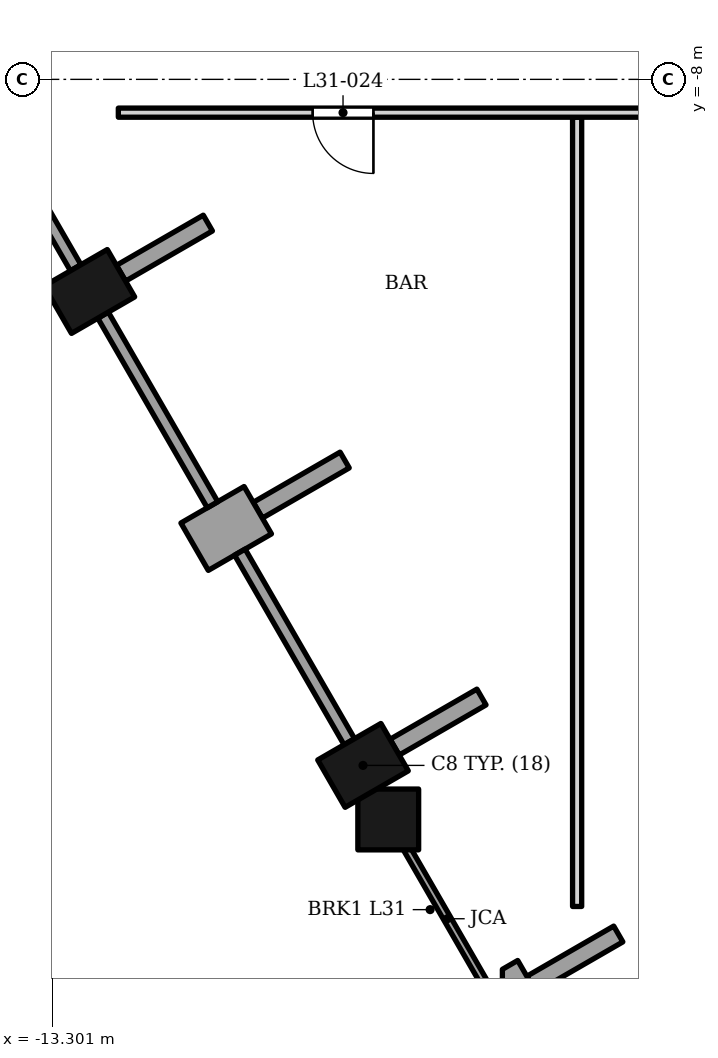
"""IFC4 building model, lengths in metres.
Left out: names, types, materials, properties, quantities, classifications, styles, units other than length and angle.
Written with IfcOpenShell. Run it as: python <this file> out.ifc"""

import sys

from ifc_helpers import new_model, si_unit, direction, frame, frame_2d, origin, origin_2d, place, context, subcontext, project, spatial, polyline, rectangle, outline, extrude, clip, halfspace, element, fill, save


model = new_model("IFC4")
c1 = context("Model", 3, precision=1e-05, world=origin(), true_north=direction((0.0, 1.0)))
c2 = subcontext(c1, "Body", "Model", "MODEL_VIEW")
j1 = project(units=[si_unit("LENGTHUNIT", "METRE"), si_unit("PLANEANGLEUNIT", "RADIAN")], contexts=[c1])
p1 = place(None, origin())
s1 = spatial("IfcSite", under=j1, at=p1, CompositionType="ELEMENT")
p2 = place(p1, origin())
s2 = spatial("IfcBuilding", under=s1, at=p2, CompositionType="ELEMENT")
p3 = place(p2, frame((0.0, 0.0, 132.6)))
s3 = spatial("IfcBuildingStorey", under=s2, at=p3, CompositionType="ELEMENT", Elevation=132.6)
for number, where, z_axis, x_axis in (
    (1, (-12.688, -11.488, 0.0), (0.0, 0.0, 1.0), (0.5, -0.866, 0.0)),
    (2, (-8.188, -19.282, 0.0), (0.0, 0.0, 1.0), (0.5, -0.866, 0.0)),
):
    element("IfcColumn", number, at=place(p3, frame(where, z_axis=z_axis, x_axis=x_axis)), inside=s3, PredefinedType="COLUMN", context=c2, shape_type="SweptSolid", body=[
        extrude(rectangle(XDim=0.9, YDim=1.2, at=origin_2d()), origin(), (0.0, 0.0, 1.0), 7.0),
    ])
p4 = place(p3, frame((-7.773, -20.171, 0.32), z_axis=(0.185133407867, -0.398791803578, 0.898159628735), x_axis=(-0.378191681892, 0.81465438711, 0.439669513737)))
e3 = element("IfcColumn", 3, at=p4, inside=s3, PredefinedType="COLUMN", context=c2, shape_type="Clipping", body=[
    clip(extrude(rectangle(XDim=1.0, YDim=1.0, at=origin_2d()), origin(), (0.0, 0.0, 1.0), 7.438), halfspace(frame((0.0, 0.0, 7.189), z_axis=(0.0, 0.0, 1.0), x_axis=(1.0, 0.0, 0.0)), False)),
])
p5 = place(p3, frame((-12.168, -11.188, 0.0), z_axis=(0.0, 0.0, 1.0), x_axis=(0.865966208357, 0.500102515474, 0.0)))
e4 = element("IfcWall", 4, at=p5, inside=s3, PredefinedType="SOLIDWALL", context=c2, shape_type="SweptSolid", body=[
    extrude(rectangle(XDim=1.65, YDim=0.3, at=frame_2d((0.825, 0.0))), origin(), (0.0, 0.0, 1.0), 6.0),
])
p6 = place(p3, frame((-10.958, -15.685, 0.0), z_axis=(0.0, 0.0, 1.0), x_axis=(0.866043267704, 0.499969057507, 0.0)))
e5 = element("IfcWall", 5, at=p6, inside=s3, PredefinedType="SOLIDWALL", context=c2, shape_type="SweptSolid", body=[
    extrude(rectangle(XDim=1.2, YDim=0.9, at=frame_2d((0.6, 0.0))), origin(), (0.0, 0.0, 1.0), 6.0),
])
p7 = place(p3, frame((-9.919, -15.085, 0.0), z_axis=(0.0, 0.0, 1.0), x_axis=(0.866040211805, 0.499974350878, 0.0)))
e6 = element("IfcWall", 6, at=p7, inside=s3, PredefinedType="SOLIDWALL", context=c2, shape_type="SweptSolid", body=[
    extrude(rectangle(XDim=1.65, YDim=0.3, at=frame_2d((0.825, 0.0))), origin(), (0.0, 0.0, 1.0), 6.0),
])
p8 = place(p3, frame((-6.24, -18.157, 0.0), z_axis=(0.0, 0.0, 1.0), x_axis=(-0.866030301974, -0.499991515992, 0.0)))
e7 = element("IfcWall", 7, at=p8, inside=s3, PredefinedType="SOLIDWALL", context=c2, shape_type="SweptSolid", body=[
    extrude(rectangle(XDim=1.649, YDim=0.3, at=frame_2d((0.825, 0.0))), origin(), (0.0, 0.0, 1.0), 6.0),
])
p9 = place(p3, origin())
e8 = element("IfcWall", 8, at=p9, inside=s3, PredefinedType="SOLIDWALL", context=c2, shape_type="SweptSolid", body=[
    extrude(outline(polyline([(-6.367, -23.637), (-6.233, -23.869), (-5.194, -23.269), (-5.644, -22.49), (-5.896, -22.636), (-5.896, -22.637), (-5.896, -23.637), (-6.367, -23.637)])), origin(), (0.0, 0.0, 1.0), 5.752),
])
p10 = place(p3, frame((-3.99, -22.055, 0.0), z_axis=(0.0, 0.0, 1.0), x_axis=(-0.866040211805, -0.499974350878, 0.0)))
e9 = element("IfcWall", 9, at=p10, inside=s3, PredefinedType="SOLIDWALL", context=c2, shape_type="SweptSolid", body=[
    extrude(rectangle(XDim=1.65, YDim=0.3, at=frame_2d((0.825, 0.0))), origin(), (0.0, 0.0, 1.0), 5.943),
])
for number, where, z_axis, x_axis in (
    (10, (-14.713, -7.981, 0.0), (0.0, 0.0, 1.0), (0.5, -0.866, 0.0)),
    (11, (-12.463, -11.878, 0.0), (0.0, 0.0, 1.0), (0.5, -0.866, 0.0)),
    (12, (-10.213, -15.775, 0.0), (0.0, 0.0, 1.0), (0.5, -0.866, 0.0)),
):
    element("IfcWall", number, at=place(p3, frame(where, z_axis=z_axis, x_axis=x_axis)), inside=s3, PredefinedType="SOLIDWALL", context=c2, shape_type="SweptSolid", body=[
        extrude(rectangle(XDim=3.6, YDim=0.2, at=frame_2d((1.8, 0.0))), origin(), (0.0, 0.0, 1.0), 6.0),
    ])
p11 = place(p3, frame((-6.054, -23.098, 0.0), z_axis=(0.0, 0.0, 1.0), x_axis=(-0.499976914471, 0.866038731811, 0.0)))
e13 = element("IfcWall", 13, at=p11, inside=s3, PredefinedType="SOLIDWALL", context=c2, shape_type="SweptSolid", body=[
    extrude(rectangle(XDim=2.99, YDim=0.12, at=frame_2d((1.495, 0.0))), origin(), (0.0, 0.0, 1.0), 5.752),
])
p12 = place(p3, frame((-4.667, -21.602, 0.0), z_axis=(0.0, 0.0, 1.0), x_axis=(0.0, 1.0, 0.0)))
e14 = element("IfcWall", 14, at=p12, inside=s3, PredefinedType="PARTITIONING", context=c2, shape_type="SweptSolid", body=[
    extrude(rectangle(XDim=12.979, YDim=0.15, at=frame_2d((6.49, 0.0))), origin(), (0.0, 0.0, 1.0), 5.712),
])
p13 = place(p3, frame((-12.212, -8.547, 0.0), z_axis=(0.0, 0.0, 1.0), x_axis=(1.0, 0.0, 0.0)))
e15 = element("IfcWall", 15, at=p13, inside=s3, PredefinedType="PARTITIONING", context=c2, shape_type="SweptSolid", body=[
    extrude(rectangle(XDim=25.313, YDim=0.15, at=frame_2d((12.657, 0.0))), origin(), (0.0, 0.0, 1.0), 5.712),
])
p14 = place(p13, frame((20.559, 0.0, 0.0)))
e16 = element("IfcOpeningElement", 16, at=p14, cuts=e15, PredefinedType="OPENING", context=c2, shape_type="SweptSolid", body=[
    extrude(rectangle(XDim=1.0, YDim=2.1, at=frame_2d((0.5, 1.05))), frame((0.0, 0.085, 0.0), z_axis=(0.0, -1.0, 0.0), x_axis=(1.0, 0.0, 0.0)), (0.0, 0.0, 1.0), 0.17),
])
p15 = place(p13, frame((11.779, 0.0, 0.0)))
e17 = element("IfcOpeningElement", 17, at=p15, cuts=e15, PredefinedType="OPENING", context=c2, shape_type="SweptSolid", body=[
    extrude(rectangle(XDim=1.0, YDim=2.1, at=frame_2d((0.5, 1.05))), frame((0.0, 0.085, 0.0), z_axis=(0.0, -1.0, 0.0), x_axis=(1.0, 0.0, 0.0)), (0.0, 0.0, 1.0), 0.17),
])
p16 = place(p13, frame((3.196, 0.0, 0.0)))
e18 = element("IfcOpeningElement", 18, at=p16, cuts=e15, PredefinedType="OPENING", context=c2, shape_type="SweptSolid", body=[
    extrude(rectangle(XDim=1.0, YDim=2.1, at=frame_2d((0.5, 1.05))), frame((0.0, 0.085, 0.0), z_axis=(0.0, -1.0, 0.0), x_axis=(1.0, 0.0, 0.0)), (0.0, 0.0, 1.0), 0.17),
])
p17 = place(p16, origin())
e19 = element("IfcDoor", 19, at=p17, inside=s3, OperationType="SINGLE_SWING_RIGHT", PredefinedType="DOOR", context=c2, shape_type="SweptSolid", body=[
    extrude(rectangle(XDim=1.0, YDim=2.1, at=frame_2d((0.5, 1.05))), frame((0.0, 0.025, 0.0), z_axis=(0.0, -1.0, 0.0), x_axis=(1.0, 0.0, 0.0)), (0.0, 0.0, 1.0), 0.05),
])
fill(e18, e19)
save(model, sys.argv[1])
